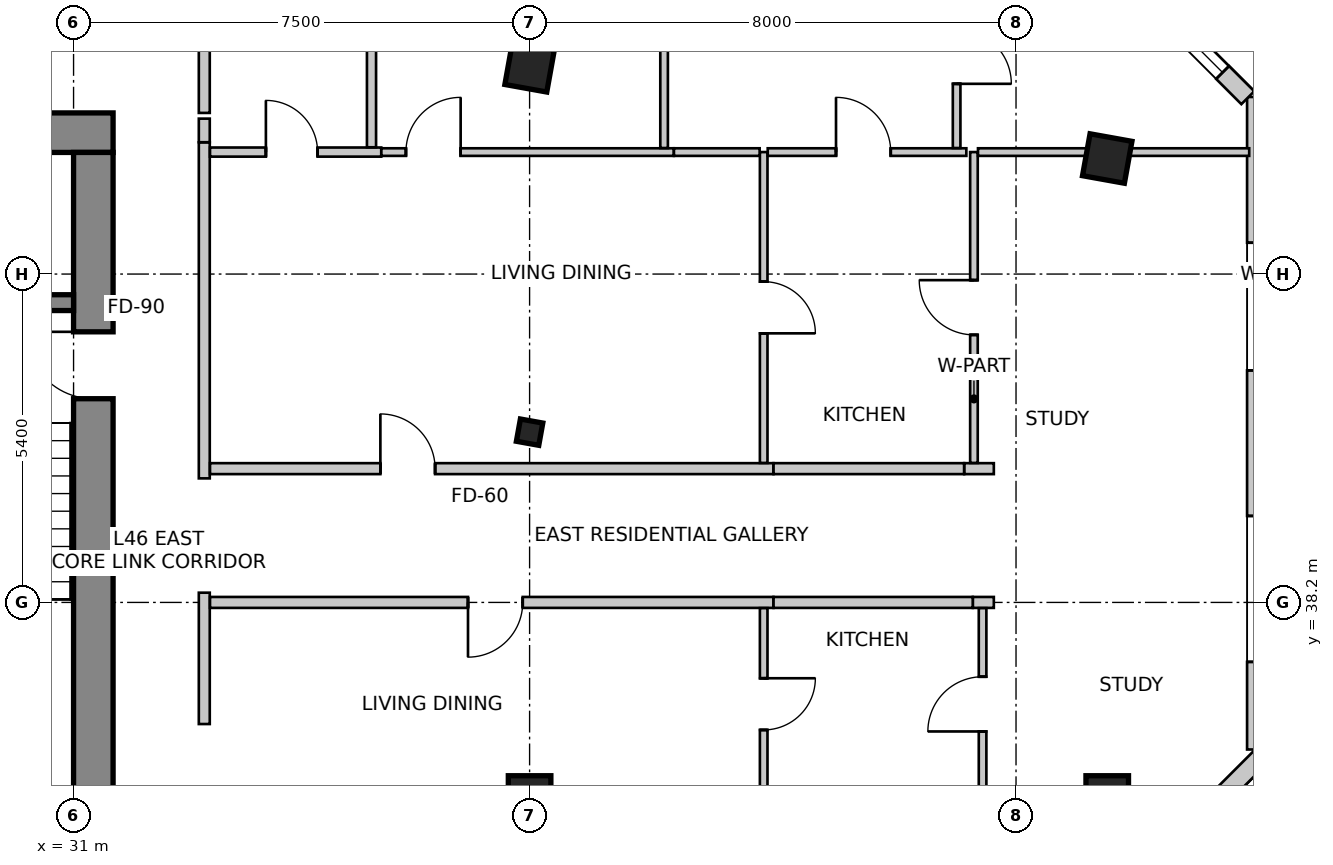
"""IFC4 building model, lengths in metres.
Left out: names, types, materials, properties, quantities, classifications, styles, units other than length and angle.
Written with IfcOpenShell. Run it as: python <this file> out.ifc"""

import sys

from ifc_helpers import new_model, si_unit, direction, frame, frame_2d, origin, origin_2d, place, context, subcontext, project, spatial, rectangle, i_section, extrude, source, transform, mapped, element, fill, save


model = new_model("IFC4")
c1 = context("Model", 3, precision=1e-05, world=origin(), true_north=direction((0.0, 1.0)))
c2 = subcontext(c1, "Body", "Model", "MODEL_VIEW")
j1 = project(units=[si_unit("LENGTHUNIT", "METRE"), si_unit("PLANEANGLEUNIT", "RADIAN")], contexts=[c1])
p1 = place(None, origin())
s1 = spatial("IfcSite", under=j1, at=p1, CompositionType="ELEMENT")
p2 = place(p1, origin())
s2 = spatial("IfcBuilding", under=s1, at=p2, CompositionType="ELEMENT")
p3 = place(p2, frame((0.0, 0.0, 186.9)))
s3 = spatial("IfcBuildingStorey", under=s2, at=p3, CompositionType="ELEMENT", Elevation=186.9)
p4 = place(p3, frame((15.95, 45.925, 0.0), z_axis=(0.0, 0.0, 1.0), x_axis=(1.0, 0.0, 0.0)))
e1 = element("IfcWall", 1, at=p4, inside=s3, PredefinedType="SHEAR", context=c2, shape_type="SweptSolid", body=[
    extrude(rectangle(XDim=15.7, YDim=0.65, at=frame_2d((7.85, 0.0))), origin(), (0.0, 0.0, 1.0), 3.5),
])
p5 = place(p3, frame((31.325, 34.2, 0.0), z_axis=(0.0, 0.0, 1.0), x_axis=(0.0, 1.0, 0.0)))
e2 = element("IfcWall", 2, at=p5, inside=s3, PredefinedType="SHEAR", context=c2, shape_type="SweptSolid", body=[
    extrude(rectangle(XDim=11.4, YDim=0.65, at=frame_2d((5.7, 0.0))), origin(), (0.0, 0.0, 1.0), 3.5),
])
m1 = source(origin(), c2, "Body", "SweptSolid", [
    extrude(rectangle(XDim=1.1, YDim=2.15, at=frame_2d((0.55, 1.075))), frame((0.0, 0.335, 0.0), z_axis=(0.0, -1.0, 0.0), x_axis=(1.0, 0.0, 0.0)), (0.0, 0.0, 1.0), 0.67),
])
p6 = place(p5, frame((7.35, 0.0, 0.0)))
e3 = element("IfcOpeningElement", 3, at=p6, cuts=e2, PredefinedType="OPENING", context=c2, shape_type="MappedRepresentation", body=[
    mapped(m1, transform((0.0, 0.0, 0.0), scale=1.0)),
])
p7 = place(p3, frame((27.5, 43.13, 0.0), z_axis=(0.0, 0.0, 1.0), x_axis=(1.0, 0.0, 0.0)))
e4 = element("IfcWall", 4, at=p7, inside=s3, PredefinedType="SHEAR", context=c2, shape_type="SweptSolid", body=[
    extrude(rectangle(XDim=3.5, YDim=0.26, at=frame_2d((1.75, 0.0))), origin(), (0.0, 0.0, 1.0), 3.5),
])
m2 = source(origin(), c2, "Body", "SweptSolid", [
    extrude(rectangle(XDim=0.7, YDim=0.7, at=origin_2d()), origin(), (0.0, 0.0, 1.0), 3.5),
])
for number, where, z_axis, x_axis in (
    (5, (38.5, 47.0, 0.0), (0.0, 0.0, 1.0), (0.984, -0.177, 0.0)),
    (6, (48.0, 45.5, 0.0), (0.0, 0.0, 1.0), (0.984, -0.177, 0.0)),
    (7, (38.5, 35.0, 0.0), (0.0, 0.0, 1.0), (1.0, 0.0, 0.0)),
    (8, (48.0, 35.0, 0.0), (0.0, 0.0, 1.0), (1.0, 0.0, 0.0)),
):
    element("IfcColumn", number, at=place(p3, frame(where, z_axis=z_axis, x_axis=x_axis)), inside=s3, PredefinedType="COLUMN", context=c2, shape_type="MappedRepresentation", body=[
        mapped(m2, transform((0.0, 0.0, 0.0), scale=1.0)),
    ])
m3 = source(origin(), c2, "Body", "SweptSolid", [
    extrude(i_section(OverallWidth=0.374, OverallDepth=0.372, WebThickness=0.016, FlangeThickness=0.026, FilletRadius=0.015, at=origin_2d()), origin(), (0.0, 0.0, 1.0), 3.5),
])
p8 = place(p3, frame((38.5, 41.0, 0.0), z_axis=(0.0, 0.0, 1.0), x_axis=(0.984195607969, -0.17708474032, 0.0)))
e9 = element("IfcColumn", 9, at=p8, inside=s3, PredefinedType="COLUMN", context=c2, shape_type="MappedRepresentation", body=[
    mapped(m3, transform((0.0, 0.0, 0.0), scale=1.0)),
])
p9 = place(p3, frame((47.076, 32.212, 0.0), z_axis=(0.0, 0.0, 1.0), x_axis=(0.707106781187, 0.707106781187, 0.0)))
e10 = element("IfcWall", 10, at=p9, inside=s3, PredefinedType="SOLIDWALL", context=c2, shape_type="SweptSolid", body=[
    extrude(rectangle(XDim=4.922, YDim=0.3, at=frame_2d((2.461, 0.0))), origin(), (0.0, 0.0, 1.0), 3.25),
])
m4 = source(origin(), c2, "Body", "SweptSolid", [
    extrude(rectangle(XDim=2.1, YDim=2.0, at=frame_2d((1.05, 1.0))), frame((0.0, 0.16, 0.0), z_axis=(0.0, -1.0, 0.0), x_axis=(1.0, 0.0, 0.0)), (0.0, 0.0, 1.0), 0.32),
])
p10 = place(p9, frame((0.879, 0.0, 0.85)))
e11 = element("IfcOpeningElement", 11, at=p10, cuts=e10, PredefinedType="OPENING", context=c2, shape_type="MappedRepresentation", body=[
    mapped(m4, transform((0.0, 0.0, 0.0), scale=1.0)),
])
p11 = place(p3, frame((50.45, 35.781, 0.0), z_axis=(0.0, 0.0, 1.0), x_axis=(0.0, 1.0, 0.0)))
e12 = element("IfcWall", 12, at=p11, inside=s3, PredefinedType="SOLIDWALL", context=c2, shape_type="SweptSolid", body=[
    extrude(rectangle(XDim=10.731, YDim=0.3, at=frame_2d((5.365, 0.0))), origin(), (0.0, 0.0, 1.0), 3.25),
])
m5 = source(origin(), c2, "Body", "SweptSolid", [
    extrude(rectangle(XDim=2.4, YDim=2.2, at=frame_2d((1.2, 1.1))), frame((0.0, 0.16, 0.0), z_axis=(0.0, -1.0, 0.0), x_axis=(1.0, 0.0, 0.0)), (0.0, 0.0, 1.0), 0.32),
])
p12 = place(p11, frame((1.441, 0.0, 0.85)))
e13 = element("IfcOpeningElement", 13, at=p12, cuts=e12, PredefinedType="OPENING", context=c2, shape_type="MappedRepresentation", body=[
    mapped(m5, transform((0.0, 0.0, 0.0), scale=1.0)),
])
p13 = place(p11, frame((6.234, 0.0, 0.85)))
e14 = element("IfcOpeningElement", 14, at=p13, cuts=e12, PredefinedType="OPENING", context=c2, shape_type="MappedRepresentation", body=[
    mapped(m4, transform((0.0, 0.0, 0.0), scale=1.0)),
])
p14 = place(p3, frame((50.312, 46.5, 0.0), z_axis=(0.0, 0.0, 1.0), x_axis=(-0.707106781187, 0.707106781187, 0.0)))
e15 = element("IfcWall", 15, at=p14, inside=s3, PredefinedType="SOLIDWALL", context=c2, shape_type="SweptSolid", body=[
    extrude(rectangle(XDim=2.673, YDim=0.3, at=frame_2d((1.337, 0.0))), origin(), (0.0, 0.0, 1.0), 3.25),
])
m6 = source(origin(), c2, "Body", "SweptSolid", [
    extrude(rectangle(XDim=1.5, YDim=1.8, at=frame_2d((0.75, 0.9))), frame((0.0, 0.16, 0.0), z_axis=(0.0, -1.0, 0.0), x_axis=(1.0, 0.0, 0.0)), (0.0, 0.0, 1.0), 0.32),
])
p15 = place(p14, frame((0.587, 0.0, 0.85)))
e16 = element("IfcOpeningElement", 16, at=p15, cuts=e15, PredefinedType="OPENING", context=c2, shape_type="MappedRepresentation", body=[
    mapped(m6, transform((0.0, 0.0, 0.0), scale=1.0)),
])
p16 = place(p3, frame((33.15, 47.706, 0.0), z_axis=(0.0, 0.0, 1.0), x_axis=(0.0, -1.0, 0.0)))
e17 = element("IfcWall", 17, at=p16, inside=s3, PredefinedType="PARTITIONING", context=c2, shape_type="SweptSolid", body=[
    extrude(rectangle(XDim=1.456, YDim=0.18, at=frame_2d((0.728, 0.0))), origin(), (0.0, 0.0, 1.0), 2.779),
])
p17 = place(p3, frame((33.15, 45.766, 0.0), z_axis=(0.0, 0.0, 1.0), x_axis=(0.0, -1.0, 0.0)))
e18 = element("IfcWall", 18, at=p17, inside=s3, PredefinedType="PARTITIONING", context=c2, shape_type="SweptSolid", body=[
    extrude(rectangle(XDim=5.526, YDim=0.18, at=frame_2d((2.763, 0.0))), origin(), (0.0, 0.0, 1.0), 2.779),
])
p18 = place(p3, frame((33.15, 46.156, 0.0), z_axis=(0.0, 0.0, 1.0), x_axis=(0.0, -1.0, 0.0)))
e19 = element("IfcWall", 19, at=p18, inside=s3, PredefinedType="PARTITIONING", context=c2, shape_type="SweptSolid", body=[
    extrude(rectangle(XDim=0.388, YDim=0.18, at=frame_2d((0.194, 0.0))), origin(), (0.0, 0.0, 1.0), 2.919),
])
p19 = place(p3, frame((33.15, 38.36, 0.0), z_axis=(0.0, 0.0, 1.0), x_axis=(0.0, -1.0, 0.0)))
e20 = element("IfcWall", 20, at=p19, inside=s3, PredefinedType="PARTITIONING", context=c2, shape_type="SweptSolid", body=[
    extrude(rectangle(XDim=2.16, YDim=0.18, at=frame_2d((1.08, 0.0))), origin(), (0.0, 0.0, 1.0), 3.25),
])
p20 = place(p3, frame((45.648, 40.4, 0.0), z_axis=(0.0, 0.0, 1.0), x_axis=(1.0, 0.0, 0.0)))
e21 = element("IfcWall", 21, at=p20, inside=s3, PredefinedType="PARTITIONING", context=c2, shape_type="SweptSolid", body=[
    extrude(rectangle(XDim=0.487, YDim=0.18, at=frame_2d((0.244, 0.0))), origin(), (0.0, 0.0, 1.0), 3.25),
])
p21 = place(p3, frame((33.244, 40.4, 0.0), z_axis=(0.0, 0.0, 1.0), x_axis=(1.0, 0.0, 0.0)))
e22 = element("IfcWall", 22, at=p21, inside=s3, PredefinedType="PARTITIONING", context=c2, shape_type="SweptSolid", body=[
    extrude(rectangle(XDim=9.266, YDim=0.18, at=frame_2d((4.633, 0.0))), origin(), (0.0, 0.0, 1.0), 2.766),
])
m7 = source(origin(), c2, "Body", "SweptSolid", [
    extrude(rectangle(XDim=0.9, YDim=2.15, at=frame_2d((0.45, 1.075))), frame((0.0, 0.1, 0.0), z_axis=(0.0, -1.0, 0.0), x_axis=(1.0, 0.0, 0.0)), (0.0, 0.0, 1.0), 0.2),
])
p22 = place(p21, frame((2.802, 0.0, 0.0)))
e23 = element("IfcOpeningElement", 23, at=p22, cuts=e22, PredefinedType="OPENING", context=c2, shape_type="MappedRepresentation", body=[
    mapped(m7, transform((0.0, 0.0, 0.0), scale=1.0)),
])
p23 = place(p3, frame((42.512, 40.4, 0.0), z_axis=(0.0, 0.0, 1.0), x_axis=(1.0, 0.0, 0.0)))
e24 = element("IfcWall", 24, at=p23, inside=s3, PredefinedType="PARTITIONING", context=c2, shape_type="SweptSolid", body=[
    extrude(rectangle(XDim=3.134, YDim=0.18, at=frame_2d((1.567, 0.0))), origin(), (0.0, 0.0, 1.0), 2.779),
])
p24 = place(p3, frame((46.135, 38.2, 0.0), z_axis=(0.0, 0.0, 1.0), x_axis=(-1.0, 0.0, 0.0)))
e25 = element("IfcWall", 25, at=p24, inside=s3, PredefinedType="PARTITIONING", context=c2, shape_type="SweptSolid", body=[
    extrude(rectangle(XDim=0.345, YDim=0.18, at=frame_2d((0.172, 0.0))), origin(), (0.0, 0.0, 1.0), 3.25),
])
p25 = place(p3, frame((42.51, 38.2, 0.0), z_axis=(0.0, 0.0, 1.0), x_axis=(-1.0, 0.0, 0.0)))
e26 = element("IfcWall", 26, at=p25, inside=s3, PredefinedType="PARTITIONING", context=c2, shape_type="SweptSolid", body=[
    extrude(rectangle(XDim=9.266, YDim=0.18, at=frame_2d((4.633, 0.0))), origin(), (0.0, 0.0, 1.0), 2.766),
])
p26 = place(p25, frame((4.123, 0.0, 0.0)))
e27 = element("IfcOpeningElement", 27, at=p26, cuts=e26, PredefinedType="OPENING", context=c2, shape_type="MappedRepresentation", body=[
    mapped(m7, transform((0.0, 0.0, 0.0), scale=1.0)),
])
p27 = place(p3, frame((45.788, 38.2, 0.0), z_axis=(0.0, 0.0, 1.0), x_axis=(-1.0, 0.0, 0.0)))
e28 = element("IfcWall", 28, at=p27, inside=s3, PredefinedType="PARTITIONING", context=c2, shape_type="SweptSolid", body=[
    extrude(rectangle(XDim=3.276, YDim=0.18, at=frame_2d((1.638, 0.0))), origin(), (0.0, 0.0, 1.0), 2.779),
])
p28 = place(p3, frame((45.808, 40.494, 0.0), z_axis=(0.0, 0.0, 1.0), x_axis=(0.0, 1.0, 0.0)))
e29 = element("IfcWall", 29, at=p28, inside=s3, PredefinedType="PARTITIONING", context=c2, shape_type="SweptSolid", body=[
    extrude(rectangle(XDim=5.112, YDim=0.125, at=frame_2d((2.556, 0.0))), origin(), (0.0, 0.0, 1.0), 2.779),
])
m8 = source(origin(), c2, "Body", "SweptSolid", [
    extrude(rectangle(XDim=0.9, YDim=2.15, at=frame_2d((0.45, 1.075))), frame((0.0, 0.073, 0.0), z_axis=(0.0, -1.0, 0.0), x_axis=(1.0, 0.0, 0.0)), (0.0, 0.0, 1.0), 0.145),
])
p29 = place(p28, frame((2.106, 0.0, 0.0)))
e30 = element("IfcOpeningElement", 30, at=p29, cuts=e29, PredefinedType="OPENING", context=c2, shape_type="MappedRepresentation", body=[
    mapped(m8, transform((0.0, 0.0, 0.0), scale=1.0)),
])
p30 = place(p3, frame((45.875, 45.606, 0.0), z_axis=(0.0, 0.0, 1.0), x_axis=(1.0, 0.0, 0.0)))
e31 = element("IfcWall", 31, at=p30, inside=s3, PredefinedType="PARTITIONING", context=c2, shape_type="SweptSolid", body=[
    extrude(rectangle(XDim=4.46, YDim=0.125, at=frame_2d((2.23, 0.0))), origin(), (0.0, 0.0, 1.0), 2.542),
])
p31 = place(p3, frame((42.35, 45.606, 0.0), z_axis=(0.0, 0.0, 1.0), x_axis=(0.0, -1.0, 0.0)))
e32 = element("IfcWall", 32, at=p31, inside=s3, PredefinedType="PARTITIONING", context=c2, shape_type="SweptSolid", body=[
    extrude(rectangle(XDim=5.112, YDim=0.125, at=frame_2d((2.556, 0.0))), origin(), (0.0, 0.0, 1.0), 2.919),
])
m9 = source(origin(), c2, "Body", "SweptSolid", [
    extrude(rectangle(XDim=0.85, YDim=2.15, at=frame_2d((0.425, 1.075))), frame((0.0, 0.073, 0.0), z_axis=(0.0, -1.0, 0.0), x_axis=(1.0, 0.0, 0.0)), (0.0, 0.0, 1.0), 0.145),
])
p32 = place(p31, frame((2.131, 0.0, 0.0)))
e33 = element("IfcOpeningElement", 33, at=p32, cuts=e32, PredefinedType="OPENING", context=c2, shape_type="MappedRepresentation", body=[
    mapped(m9, transform((0.0, 0.0, 0.0), scale=1.0)),
])
p33 = place(p3, frame((33.244, 45.606, 0.0), z_axis=(0.0, 0.0, 1.0), x_axis=(1.0, 0.0, 0.0)))
e34 = element("IfcWall", 34, at=p33, inside=s3, PredefinedType="PARTITIONING", context=c2, shape_type="SweptSolid", body=[
    extrude(rectangle(XDim=2.816, YDim=0.15, at=frame_2d((1.408, 0.0))), origin(), (0.0, 0.0, 1.0), 2.779),
])
m10 = source(origin(), c2, "Body", "SweptSolid", [
    extrude(rectangle(XDim=0.85, YDim=2.15, at=frame_2d((0.425, 1.075))), frame((0.0, 0.085, 0.0), z_axis=(0.0, -1.0, 0.0), x_axis=(1.0, 0.0, 0.0)), (0.0, 0.0, 1.0), 0.17),
])
p34 = place(p33, frame((0.919, 0.0, 0.0)))
e35 = element("IfcOpeningElement", 35, at=p34, cuts=e34, PredefinedType="OPENING", context=c2, shape_type="MappedRepresentation", body=[
    mapped(m10, transform((0.0, 0.0, 0.0), scale=1.0)),
])
p35 = place(p3, frame((36.062, 45.606, 0.0), z_axis=(0.0, 0.0, 1.0), x_axis=(1.0, 0.0, 0.0)))
e36 = element("IfcWall", 36, at=p35, inside=s3, PredefinedType="PARTITIONING", context=c2, shape_type="SweptSolid", body=[
    extrude(rectangle(XDim=4.81, YDim=0.125, at=frame_2d((2.405, 0.0))), origin(), (0.0, 0.0, 1.0), 2.766),
])
p36 = place(p35, frame((0.404, 0.0, 0.0)))
e37 = element("IfcOpeningElement", 37, at=p36, cuts=e36, PredefinedType="OPENING", context=c2, shape_type="MappedRepresentation", body=[
    mapped(m8, transform((0.0, 0.0, 0.0), scale=1.0)),
])
p37 = place(p3, frame((40.874, 45.606, 0.0), z_axis=(0.0, 0.0, 1.0), x_axis=(1.0, 0.0, 0.0)))
e38 = element("IfcWall", 38, at=p37, inside=s3, PredefinedType="PARTITIONING", context=c2, shape_type="SweptSolid", body=[
    extrude(rectangle(XDim=1.409, YDim=0.125, at=frame_2d((0.705, 0.0))), origin(), (0.0, 0.0, 1.0), 3.25),
])
p38 = place(p3, frame((42.417, 45.606, 0.0), z_axis=(0.0, 0.0, 1.0), x_axis=(1.0, 0.0, 0.0)))
e39 = element("IfcWall", 39, at=p38, inside=s3, PredefinedType="PARTITIONING", context=c2, shape_type="SweptSolid", body=[
    extrude(rectangle(XDim=3.267, YDim=0.125, at=frame_2d((1.633, 0.0))), origin(), (0.0, 0.0, 1.0), 3.25),
])
p39 = place(p38, frame((1.123, 0.0, 0.0)))
e40 = element("IfcOpeningElement", 40, at=p39, cuts=e39, PredefinedType="OPENING", context=c2, shape_type="MappedRepresentation", body=[
    mapped(m8, transform((0.0, 0.0, 0.0), scale=1.0)),
])
p40 = place(p3, frame((35.9, 50.34, 0.0), z_axis=(0.0, 0.0, 1.0), x_axis=(0.0, -1.0, 0.0)))
e41 = element("IfcWall", 41, at=p40, inside=s3, PredefinedType="PARTITIONING", context=c2, shape_type="SweptSolid", body=[
    extrude(rectangle(XDim=4.655, YDim=0.15, at=frame_2d((2.327, 0.0))), origin(), (0.0, 0.0, 1.0), 2.542),
])
p41 = place(p3, frame((40.712, 49.512, 0.0), z_axis=(0.0, 0.0, 1.0), x_axis=(0.0, -1.0, 0.0)))
e42 = element("IfcWall", 42, at=p41, inside=s3, PredefinedType="PARTITIONING", context=c2, shape_type="SweptSolid", body=[
    extrude(rectangle(XDim=3.84, YDim=0.125, at=frame_2d((1.92, 0.0))), origin(), (0.0, 0.0, 1.0), 2.542),
])
p42 = place(p3, frame((45.523, 48.684, 0.0), z_axis=(0.0, 0.0, 1.0), x_axis=(0.0, -1.0, 0.0)))
e43 = element("IfcWall", 43, at=p42, inside=s3, PredefinedType="PARTITIONING", context=c2, shape_type="SweptSolid", body=[
    extrude(rectangle(XDim=3.012, YDim=0.125, at=frame_2d((1.506, 0.0))), origin(), (0.0, 0.0, 1.0), 2.542),
])
p43 = place(p42, frame((1.056, 0.0, 0.0)))
e44 = element("IfcOpeningElement", 44, at=p43, cuts=e43, PredefinedType="OPENING", context=c2, shape_type="MappedRepresentation", body=[
    mapped(m8, transform((0.0, 0.0, 0.0), scale=1.0)),
])
p44 = place(p3, frame((45.95, 34.95, 0.0), z_axis=(0.0, 0.0, 1.0), x_axis=(0.0, 1.0, 0.0)))
e45 = element("IfcWall", 45, at=p44, inside=s3, PredefinedType="PARTITIONING", context=c2, shape_type="SweptSolid", body=[
    extrude(rectangle(XDim=3.156, YDim=0.125, at=frame_2d((1.578, 0.0))), origin(), (0.0, 0.0, 1.0), 2.542),
])
p45 = place(p44, frame((1.128, 0.0, 0.0)))
e46 = element("IfcOpeningElement", 46, at=p45, cuts=e45, PredefinedType="OPENING", context=c2, shape_type="MappedRepresentation", body=[
    mapped(m8, transform((0.0, 0.0, 0.0), scale=1.0)),
])
p46 = place(p3, frame((42.35, 38.106, 0.0), z_axis=(0.0, 0.0, 1.0), x_axis=(0.0, -1.0, 0.0)))
e47 = element("IfcWall", 47, at=p46, inside=s3, PredefinedType="PARTITIONING", context=c2, shape_type="SweptSolid", body=[
    extrude(rectangle(XDim=3.156, YDim=0.125, at=frame_2d((1.578, 0.0))), origin(), (0.0, 0.0, 1.0), 2.542),
])
p47 = place(p46, frame((1.153, 0.0, 0.0)))
e48 = element("IfcOpeningElement", 48, at=p47, cuts=e47, PredefinedType="OPENING", context=c2, shape_type="MappedRepresentation", body=[
    mapped(m9, transform((0.0, 0.0, 0.0), scale=1.0)),
])
m11 = source(origin(), c2, "Body", "SweptSolid", [
    extrude(rectangle(XDim=1.5, YDim=1.8, at=frame_2d((0.75, 0.9))), frame((0.0, -0.015, 0.0), z_axis=(0.0, -1.0, 0.0), x_axis=(1.0, 0.0, 0.0)), (0.0, 0.0, 1.0), 0.06),
])
p48 = place(p15, origin())
e49 = element("IfcWindow", 49, at=p48, inside=s3, PartitioningType="SINGLE_PANEL", PredefinedType="WINDOW", context=c2, shape_type="MappedRepresentation", body=[
    mapped(m11, transform((0.0, 0.0, 0.0), scale=1.0)),
])
fill(e16, e49)
m12 = source(origin(), c2, "Body", "SweptSolid", [
    extrude(rectangle(XDim=1.1, YDim=2.15, at=frame_2d((0.55, 1.075))), frame((0.0, 0.025, 0.0), z_axis=(0.0, -1.0, 0.0), x_axis=(1.0, 0.0, 0.0)), (0.0, 0.0, 1.0), 0.05),
])
p49 = place(p6, origin())
e50 = element("IfcDoor", 50, at=p49, inside=s3, OperationType="SINGLE_SWING_RIGHT", PredefinedType="DOOR", context=c2, shape_type="MappedRepresentation", body=[
    mapped(m12, transform((0.0, 0.0, 0.0), scale=1.0)),
])
fill(e3, e50)
m13 = source(origin(), c2, "Body", "SweptSolid", [
    extrude(rectangle(XDim=0.9, YDim=2.15, at=frame_2d((0.45, 1.075))), frame((0.0, 0.025, 0.0), z_axis=(0.0, -1.0, 0.0), x_axis=(1.0, 0.0, 0.0)), (0.0, 0.0, 1.0), 0.05),
])
p50 = place(p29, origin())
e51 = element("IfcDoor", 51, at=p50, inside=s3, OperationType="SINGLE_SWING_RIGHT", PredefinedType="DOOR", context=c2, shape_type="MappedRepresentation", body=[
    mapped(m13, transform((0.0, 0.0, 0.0), scale=1.0)),
])
fill(e30, e51)
m14 = source(origin(), c2, "Body", "SweptSolid", [
    extrude(rectangle(XDim=0.9, YDim=2.15, at=frame_2d((0.45, 1.075))), frame((0.0, 0.025, 0.0), z_axis=(0.0, -1.0, 0.0), x_axis=(1.0, 0.0, 0.0)), (0.0, 0.0, 1.0), 0.05),
])
p51 = place(p22, origin())
e52 = element("IfcDoor", 52, at=p51, inside=s3, OperationType="SINGLE_SWING_LEFT", PredefinedType="DOOR", context=c2, shape_type="MappedRepresentation", body=[
    mapped(m14, transform((0.0, 0.0, 0.0), scale=1.0)),
])
fill(e23, e52)
m15 = source(origin(), c2, "Body", "SweptSolid", [
    extrude(rectangle(XDim=0.85, YDim=2.15, at=frame_2d((0.425, 1.075))), frame((0.0, 0.025, 0.0), z_axis=(0.0, -1.0, 0.0), x_axis=(1.0, 0.0, 0.0)), (0.0, 0.0, 1.0), 0.05),
])
p52 = place(p32, origin())
e53 = element("IfcDoor", 53, at=p52, inside=s3, OperationType="SINGLE_SWING_RIGHT", PredefinedType="DOOR", context=c2, shape_type="MappedRepresentation", body=[
    mapped(m15, transform((0.0, 0.0, 0.0), scale=1.0)),
])
fill(e33, e53)
p53 = place(p34, origin())
e54 = element("IfcDoor", 54, at=p53, inside=s3, OperationType="SINGLE_SWING_LEFT", PredefinedType="DOOR", context=c2, shape_type="MappedRepresentation", body=[
    mapped(m15, transform((0.0, 0.0, 0.0), scale=1.0)),
])
fill(e35, e54)
p54 = place(p36, origin())
e55 = element("IfcDoor", 55, at=p54, inside=s3, OperationType="SINGLE_SWING_RIGHT", PredefinedType="DOOR", context=c2, shape_type="MappedRepresentation", body=[
    mapped(m13, transform((0.0, 0.0, 0.0), scale=1.0)),
])
fill(e37, e55)
p55 = place(p39, origin())
e56 = element("IfcDoor", 56, at=p55, inside=s3, OperationType="SINGLE_SWING_LEFT", PredefinedType="DOOR", context=c2, shape_type="MappedRepresentation", body=[
    mapped(m13, transform((0.0, 0.0, 0.0), scale=1.0)),
])
fill(e40, e56)
p56 = place(p43, origin())
e57 = element("IfcDoor", 57, at=p56, inside=s3, OperationType="SINGLE_SWING_RIGHT", PredefinedType="DOOR", context=c2, shape_type="MappedRepresentation", body=[
    mapped(m13, transform((0.0, 0.0, 0.0), scale=1.0)),
])
fill(e44, e57)
p57 = place(p45, origin())
e58 = element("IfcDoor", 58, at=p57, inside=s3, OperationType="SINGLE_SWING_LEFT", PredefinedType="DOOR", context=c2, shape_type="MappedRepresentation", body=[
    mapped(m13, transform((0.0, 0.0, 0.0), scale=1.0)),
])
fill(e46, e58)
p58 = place(p26, origin())
e59 = element("IfcDoor", 59, at=p58, inside=s3, OperationType="SINGLE_SWING_RIGHT", PredefinedType="DOOR", context=c2, shape_type="MappedRepresentation", body=[
    mapped(m14, transform((0.0, 0.0, 0.0), scale=1.0)),
])
fill(e27, e59)
p59 = place(p47, origin())
e60 = element("IfcDoor", 60, at=p59, inside=s3, OperationType="SINGLE_SWING_LEFT", PredefinedType="DOOR", context=c2, shape_type="MappedRepresentation", body=[
    mapped(m15, transform((0.0, 0.0, 0.0), scale=1.0)),
])
fill(e48, e60)
save(model, sys.argv[1])
